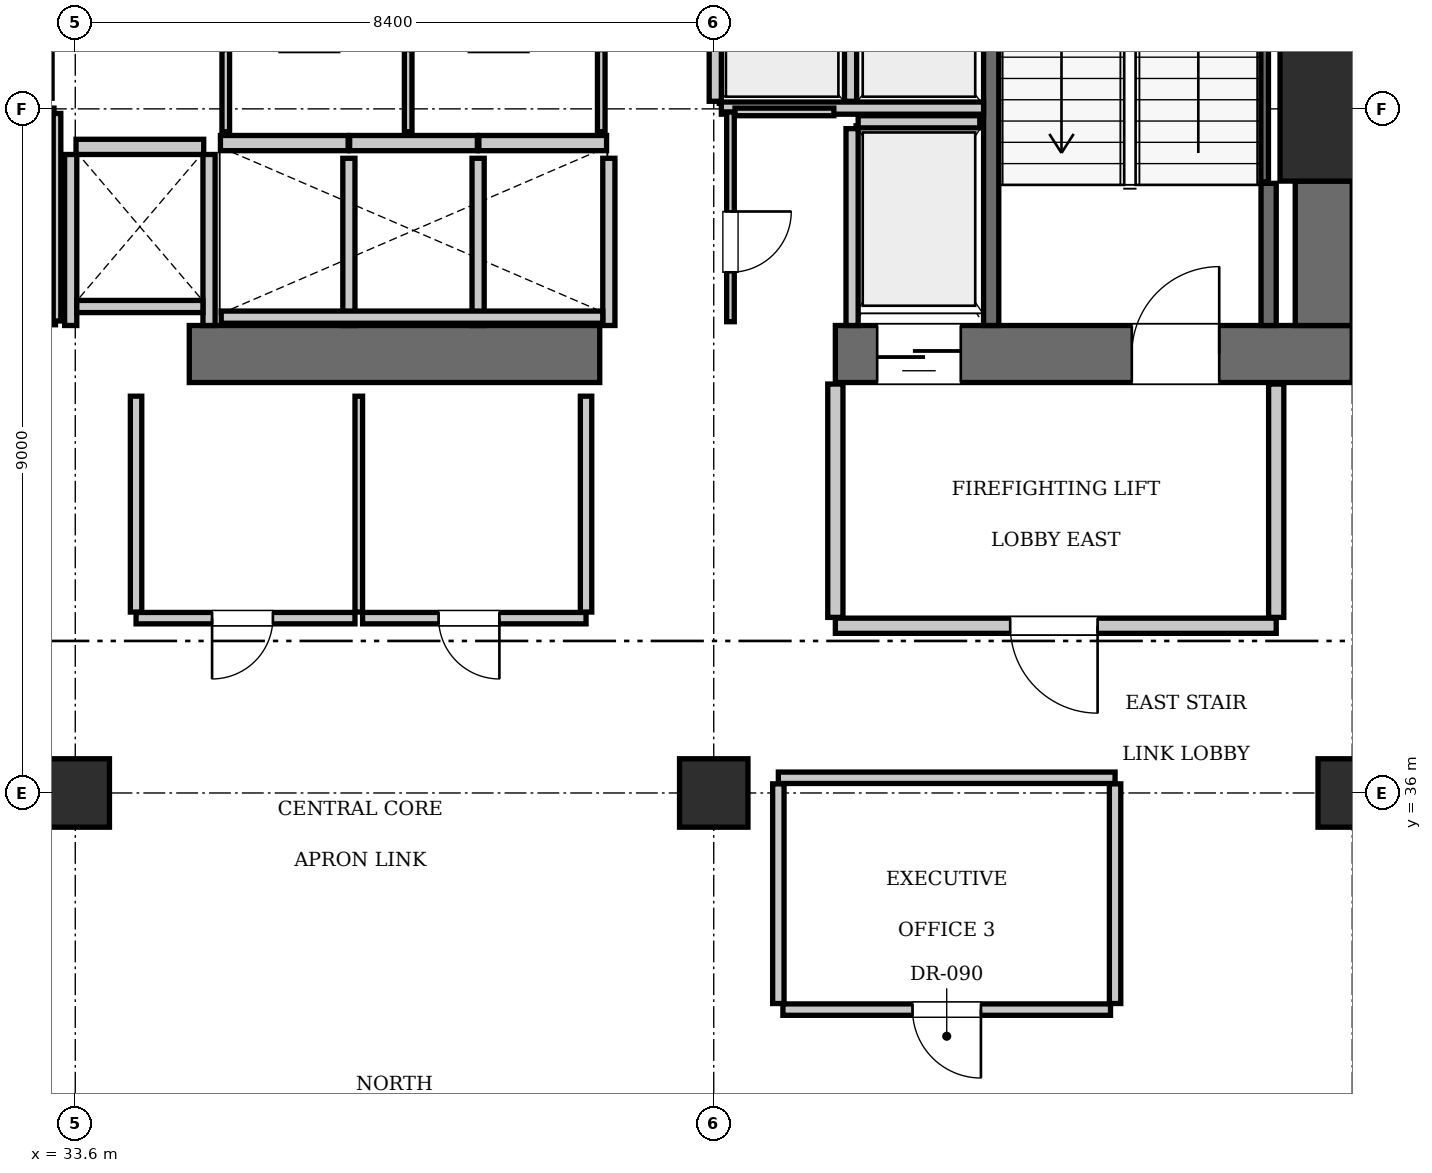
"""IFC4 building model, lengths in metres.
Left out: names, types, materials, properties, quantities, classifications, styles, units other than length and angle.
Written with IfcOpenShell. Run it as: python <this file> out.ifc"""

import sys

from ifc_helpers import new_model, si_unit, direction, frame, frame_2d, origin, origin_2d, place, context, subcontext, project, spatial, rectangle, extrude, element, fill, save


model = new_model("IFC4")
c1 = context("Model", 3, precision=1e-05, world=origin(), true_north=direction((0.0, 1.0)))
c2 = subcontext(c1, "Body", "Model", "MODEL_VIEW")
j1 = project(units=[si_unit("LENGTHUNIT", "METRE"), si_unit("PLANEANGLEUNIT", "RADIAN")], contexts=[c1])
p1 = place(None, origin())
s1 = spatial("IfcSite", under=j1, at=p1, CompositionType="ELEMENT")
p2 = place(p1, origin())
s2 = spatial("IfcBuilding", under=s1, at=p2, CompositionType="ELEMENT")
p3 = place(p2, frame((0.0, 0.0, 204.4)))
s3 = spatial("IfcBuildingStorey", under=s2, at=p3, CompositionType="ELEMENT", Elevation=204.4)
p4 = place(p3, frame((50.4, 45.0, 0.0), z_axis=(0.0, 0.0, 1.0), x_axis=(1.0, 0.0, 0.0)))
e1 = element("IfcColumn", 1, at=p4, inside=s3, PredefinedType="COLUMN", context=c2, shape_type="SweptSolid", body=[
    extrude(rectangle(XDim=1.9, YDim=1.9, at=origin_2d()), origin(), (0.0, 0.0, 1.0), 3.85),
])
p5 = place(p3, frame((35.1, 41.775, 0.0), z_axis=(0.0, 0.0, 1.0), x_axis=(1.0, 0.0, 0.0)))
e2 = element("IfcWall", 2, at=p5, inside=s3, PredefinedType="SHEAR", context=c2, shape_type="SweptSolid", body=[
    extrude(rectangle(XDim=5.4, YDim=0.75, at=frame_2d((2.7, 0.0))), origin(), (0.0, 0.0, 1.0), 3.85),
])
p6 = place(p3, frame((43.6, 41.775, 0.0), z_axis=(0.0, 0.0, 1.0), x_axis=(1.0, 0.0, 0.0)))
e3 = element("IfcWall", 3, at=p6, inside=s3, PredefinedType="SHEAR", context=c2, shape_type="SweptSolid", body=[
    extrude(rectangle(XDim=6.8, YDim=0.75, at=frame_2d((3.4, 0.0))), origin(), (0.0, 0.0, 1.0), 3.85),
])
p7 = place(p6, frame((3.9, 0.0, 0.0)))
e4 = element("IfcOpeningElement", 4, at=p7, cuts=e3, PredefinedType="OPENING", context=c2, shape_type="SweptSolid", body=[
    extrude(rectangle(XDim=1.15, YDim=2.15, at=frame_2d((0.575, 1.075))), frame((0.0, 0.385, 0.0), z_axis=(0.0, -1.0, 0.0), x_axis=(1.0, 0.0, 0.0)), (0.0, 0.0, 1.0), 0.77),
])
p8 = place(p6, frame((0.55, 0.0, 0.0)))
e5 = element("IfcOpeningElement", 5, at=p8, cuts=e3, PredefinedType="OPENING", context=c2, shape_type="SweptSolid", body=[
    extrude(rectangle(XDim=1.1, YDim=2.2, at=frame_2d((0.55, 1.1))), frame((0.0, 0.385, 0.0), z_axis=(0.0, -1.0, 0.0), x_axis=(1.0, 0.0, 0.0)), (0.0, 0.0, 1.0), 0.77),
])
p9 = place(p3, frame((50.025, 42.15, 0.0), z_axis=(0.0, 0.0, 1.0), x_axis=(0.0, 1.0, 0.0)))
e6 = element("IfcWall", 6, at=p9, inside=s3, PredefinedType="SHEAR", context=c2, shape_type="SweptSolid", body=[
    extrude(rectangle(XDim=1.9, YDim=0.75, at=frame_2d((0.95, 0.0))), origin(), (0.0, 0.0, 1.0), 3.85),
])
for number, where, z_axis, x_axis in (
    (7, (33.6, 36.0, 0.0), (0.0, 0.0, 1.0), (1.0, 0.0, 0.0)),
    (8, (42.0, 36.0, 0.0), (0.0, 0.0, 1.0), (1.0, 0.0, 0.0)),
    (9, (50.4, 36.0, 0.0), (0.0, 0.0, 1.0), (1.0, 0.0, 0.0)),
):
    element("IfcColumn", number, at=place(p3, frame(where, z_axis=z_axis, x_axis=x_axis)), inside=s3, PredefinedType="COLUMN", context=c2, shape_type="SweptSolid", body=[
        extrude(rectangle(XDim=0.9, YDim=0.9, at=origin_2d()), origin(), (0.0, 0.0, 1.0), 3.85),
    ])
p10 = place(p3, frame((45.65, 42.15, 0.0), z_axis=(0.0, 0.0, 1.0), x_axis=(0.0, 1.0, 0.0)))
e10 = element("IfcWall", 10, at=p10, inside=s3, PredefinedType="SOLIDWALL", context=c2, shape_type="SweptSolid", body=[
    extrude(rectangle(XDim=9.0, YDim=0.2, at=frame_2d((4.5, 0.0))), origin(), (0.0, 0.0, 1.0), 3.61),
])
p11 = place(p3, frame((49.3, 42.15, 0.0), z_axis=(0.0, 0.0, 1.0), x_axis=(0.0, 1.0, 0.0)))
e11 = element("IfcWall", 11, at=p11, inside=s3, PredefinedType="SOLIDWALL", context=c2, shape_type="SweptSolid", body=[
    extrude(rectangle(XDim=1.87, YDim=0.2, at=frame_2d((0.935, 0.0))), origin(), (0.0, 0.0, 1.0), 3.61),
])
p12 = place(p3, frame((49.248, 44.04, 0.0), z_axis=(0.0, 0.0, 1.0), x_axis=(0.0, 1.0, 0.0)))
e12 = element("IfcWall", 12, at=p12, inside=s3, PredefinedType="SOLIDWALL", context=c2, shape_type="SweptSolid", body=[
    extrude(rectangle(XDim=1.92, YDim=0.1, at=frame_2d((0.96, 0.0))), origin(), (0.0, 0.0, 1.0), 3.61),
])
for number, where, z_axis, x_axis in (
    (13, (35.51, 44.55, 0.0), (0.0, 0.0, 1.0), (1.0, 0.0, 0.0)),
    (14, (37.21, 44.55, 0.0), (0.0, 0.0, 1.0), (1.0, 0.0, 0.0)),
):
    element("IfcWall", number, at=place(p3, frame(where, z_axis=z_axis, x_axis=x_axis)), inside=s3, PredefinedType="SOLIDWALL", context=c2, shape_type="SweptSolid", body=[
        extrude(rectangle(XDim=1.68, YDim=0.2, at=frame_2d((0.84, 0.0))), origin(), (0.0, 0.0, 1.0), 3.61),
    ])
p13 = place(p3, frame((38.91, 44.55, 0.0), z_axis=(0.0, 0.0, 1.0), x_axis=(1.0, 0.0, 0.0)))
e15 = element("IfcWall", 15, at=p13, inside=s3, PredefinedType="SOLIDWALL", context=c2, shape_type="SweptSolid", body=[
    extrude(rectangle(XDim=1.68, YDim=0.2, at=frame_2d((0.84, 0.0))), origin(), (0.0, 0.0, 1.0), 3.61),
])
p14 = place(p3, frame((33.61, 44.5, 0.0), z_axis=(0.0, 0.0, 1.0), x_axis=(1.0, 0.0, 0.0)))
e16 = element("IfcWall", 16, at=p14, inside=s3, PredefinedType="SOLIDWALL", context=c2, shape_type="SweptSolid", body=[
    extrude(rectangle(XDim=1.68, YDim=0.2, at=frame_2d((0.84, 0.0))), origin(), (0.0, 0.0, 1.0), 3.61),
])
p15 = place(p3, frame((43.9, 44.83, 0.0), z_axis=(0.0, 0.0, 1.0), x_axis=(1.0, 0.0, 0.0)))
e17 = element("IfcWall", 17, at=p15, inside=s3, PredefinedType="SOLIDWALL", context=c2, shape_type="SweptSolid", body=[
    extrude(rectangle(XDim=1.6, YDim=0.16, at=frame_2d((0.8, 0.0))), origin(), (0.0, 0.0, 1.0), 3.61),
])
p16 = place(p3, frame((43.82, 42.15, 0.0), z_axis=(0.0, 0.0, 1.0), x_axis=(0.0, 1.0, 0.0)))
e18 = element("IfcWall", 18, at=p16, inside=s3, PredefinedType="SOLIDWALL", context=c2, shape_type="SweptSolid", body=[
    extrude(rectangle(XDim=2.59, YDim=0.16, at=frame_2d((1.295, 0.0))), origin(), (0.0, 0.0, 1.0), 3.61),
])
for number, where, z_axis, x_axis in (
    (19, (42.02, 45.1, 0.0), (0.0, 0.0, 1.0), (0.0, 1.0, 0.0)),
    (20, (43.8, 45.1, 0.0), (0.0, 0.0, 1.0), (0.0, 1.0, 0.0)),
):
    element("IfcWall", number, at=place(p3, frame(where, z_axis=z_axis, x_axis=x_axis)), inside=s3, PredefinedType="SOLIDWALL", context=c2, shape_type="SweptSolid", body=[
        extrude(rectangle(XDim=1.95, YDim=0.16, at=frame_2d((0.975, 0.0))), origin(), (0.0, 0.0, 1.0), 3.61),
    ])
p17 = place(p3, frame((42.1, 45.01, 0.0), z_axis=(0.0, 0.0, 1.0), x_axis=(1.0, 0.0, 0.0)))
e21 = element("IfcWall", 21, at=p17, inside=s3, PredefinedType="SOLIDWALL", context=c2, shape_type="SweptSolid", body=[
    extrude(rectangle(XDim=3.45, YDim=0.16, at=frame_2d((1.725, 0.0))), origin(), (0.0, 0.0, 1.0), 3.61),
])
for number, where, z_axis, x_axis in (
    (22, (37.2, 42.15, 0.0), (0.0, 0.0, 1.0), (0.0, 1.0, 0.0)),
    (23, (38.9, 42.15, 0.0), (0.0, 0.0, 1.0), (0.0, 1.0, 0.0)),
    (24, (40.62, 42.15, 0.0), (0.0, 0.0, 1.0), (0.0, 1.0, 0.0)),
):
    element("IfcWall", number, at=place(p3, frame(where, z_axis=z_axis, x_axis=x_axis)), inside=s3, PredefinedType="SOLIDWALL", context=c2, shape_type="SweptSolid", body=[
        extrude(rectangle(XDim=2.2, YDim=0.16, at=frame_2d((1.1, 0.0))), origin(), (0.0, 0.0, 1.0), 3.61),
    ])
p18 = place(p3, frame((35.52, 42.26, 0.0), z_axis=(0.0, 0.0, 1.0), x_axis=(1.0, 0.0, 0.0)))
e25 = element("IfcWall", 25, at=p18, inside=s3, PredefinedType="SOLIDWALL", context=c2, shape_type="SweptSolid", body=[
    extrude(rectangle(XDim=5.02, YDim=0.16, at=frame_2d((2.51, 0.0))), origin(), (0.0, 0.0, 1.0), 3.61),
])
for number, where, z_axis, x_axis in (
    (26, (33.54, 42.15, 0.0), (0.0, 0.0, 1.0), (0.0, 1.0, 0.0)),
    (27, (35.36, 42.15, 0.0), (0.0, 0.0, 1.0), (0.0, 1.0, 0.0)),
):
    element("IfcWall", number, at=place(p3, frame(where, z_axis=z_axis, x_axis=x_axis)), inside=s3, PredefinedType="SOLIDWALL", context=c2, shape_type="SweptSolid", body=[
        extrude(rectangle(XDim=2.25, YDim=0.16, at=frame_2d((1.125, 0.0))), origin(), (0.0, 0.0, 1.0), 3.61),
    ])
p19 = place(p3, frame((33.62, 42.4, 0.0), z_axis=(0.0, 0.0, 1.0), x_axis=(1.0, 0.0, 0.0)))
e28 = element("IfcWall", 28, at=p19, inside=s3, PredefinedType="SOLIDWALL", context=c2, shape_type="SweptSolid", body=[
    extrude(rectangle(XDim=1.66, YDim=0.16, at=frame_2d((0.83, 0.0))), origin(), (0.0, 0.0, 1.0), 3.61),
])
p20 = place(p3, frame((43.6, 38.2, 0.0), z_axis=(0.0, 0.0, 1.0), x_axis=(1.0, 0.0, 0.0)))
e29 = element("IfcWall", 29, at=p20, inside=s3, PredefinedType="PARTITIONING", context=c2, shape_type="SweptSolid", body=[
    extrude(rectangle(XDim=5.8, YDim=0.2, at=frame_2d((2.9, 0.0))), origin(), (0.0, 0.0, 1.0), 3.61),
])
p21 = place(p20, frame((2.3, 0.0, 0.0)))
e30 = element("IfcOpeningElement", 30, at=p21, cuts=e29, PredefinedType="OPENING", context=c2, shape_type="SweptSolid", body=[
    extrude(rectangle(XDim=1.15, YDim=2.15, at=frame_2d((0.575, 1.075))), frame((0.0, 0.11, 0.0), z_axis=(0.0, -1.0, 0.0), x_axis=(1.0, 0.0, 0.0)), (0.0, 0.0, 1.0), 0.22),
])
for number, where, z_axis, x_axis in (
    (31, (43.6, 38.31, 0.0), (0.0, 0.0, 1.0), (0.0, 1.0, 0.0)),
    (32, (49.4, 38.31, 0.0), (0.0, 0.0, 1.0), (0.0, 1.0, 0.0)),
):
    element("IfcWall", number, at=place(p3, frame(where, z_axis=z_axis, x_axis=x_axis)), inside=s3, PredefinedType="PARTITIONING", context=c2, shape_type="SweptSolid", body=[
        extrude(rectangle(XDim=3.07, YDim=0.2, at=frame_2d((1.535, 0.0))), origin(), (0.0, 0.0, 1.0), 3.61),
    ])
p22 = place(p3, frame((32.02, 42.21, 0.0), z_axis=(0.0, 0.0, 1.0), x_axis=(1.0, 0.0, 0.0)))
e33 = element("IfcWall", 33, at=p22, inside=s3, PredefinedType="PARTITIONING", context=c2, shape_type="SweptSolid", body=[
    extrude(rectangle(XDim=1.32, YDim=0.1, at=frame_2d((0.66, 0.0))), origin(), (0.0, 0.0, 1.0), 3.61),
])
p23 = place(p22, frame((0.24, 0.0, 0.0)))
e34 = element("IfcOpeningElement", 34, at=p23, cuts=e33, PredefinedType="OPENING", context=c2, shape_type="SweptSolid", body=[
    extrude(rectangle(XDim=0.8, YDim=2.05, at=frame_2d((0.4, 1.025))), frame((0.0, 0.06, 0.0), z_axis=(0.0, -1.0, 0.0), x_axis=(1.0, 0.0, 0.0)), (0.0, 0.0, 1.0), 0.12),
])
p24 = place(p3, frame((31.84, 44.96, 0.0), z_axis=(0.0, 0.0, 1.0), x_axis=(1.0, 0.0, 0.0)))
e35 = element("IfcWall", 35, at=p24, inside=s3, PredefinedType="PARTITIONING", context=c2, shape_type="SweptSolid", body=[
    extrude(rectangle(XDim=1.48, YDim=0.1, at=frame_2d((0.74, 0.0))), origin(), (0.0, 0.0, 1.0), 3.61),
])
p25 = place(p3, frame((33.36, 42.21, 0.0), z_axis=(0.0, 0.0, 1.0), x_axis=(0.0, 1.0, 0.0)))
e36 = element("IfcWall", 36, at=p25, inside=s3, PredefinedType="PARTITIONING", context=c2, shape_type="SweptSolid", body=[
    extrude(rectangle(XDim=2.73, YDim=0.1, at=frame_2d((1.365, 0.0))), origin(), (0.0, 0.0, 1.0), 3.61),
])
for number, where, z_axis, x_axis in (
    (37, (35.58, 44.7, 0.0), (0.0, 0.0, 1.0), (0.0, 1.0, 0.0)),
    (38, (37.98, 44.7, 0.0), (0.0, 0.0, 1.0), (0.0, 1.0, 0.0)),
    (39, (40.52, 44.7, 0.0), (0.0, 0.0, 1.0), (0.0, 1.0, 0.0)),
):
    element("IfcWall", number, at=place(p3, frame(where, z_axis=z_axis, x_axis=x_axis)), inside=s3, PredefinedType="PARTITIONING", context=c2, shape_type="SweptSolid", body=[
        extrude(rectangle(XDim=1.08, YDim=0.1, at=frame_2d((0.54, 0.0))), origin(), (0.0, 0.0, 1.0), 3.61),
    ])
p26 = place(p3, frame((42.22, 42.2, 0.0), z_axis=(0.0, 0.0, 1.0), x_axis=(0.0, 1.0, 0.0)))
e40 = element("IfcWall", 40, at=p26, inside=s3, PredefinedType="PARTITIONING", context=c2, shape_type="SweptSolid", body=[
    extrude(rectangle(XDim=2.76, YDim=0.1, at=frame_2d((1.38, 0.0))), origin(), (0.0, 0.0, 1.0), 3.61),
])
p27 = place(p26, frame((0.65, 0.0, 0.0)))
e41 = element("IfcOpeningElement", 41, at=p27, cuts=e40, PredefinedType="OPENING", context=c2, shape_type="SweptSolid", body=[
    extrude(rectangle(XDim=0.8, YDim=2.05, at=frame_2d((0.4, 1.025))), frame((0.0, 0.06, 0.0), z_axis=(0.0, -1.0, 0.0), x_axis=(1.0, 0.0, 0.0)), (0.0, 0.0, 1.0), 0.12),
])
p28 = place(p3, frame((42.28, 44.96, 0.0), z_axis=(0.0, 0.0, 1.0), x_axis=(1.0, 0.0, 0.0)))
e42 = element("IfcWall", 42, at=p28, inside=s3, PredefinedType="PARTITIONING", context=c2, shape_type="SweptSolid", body=[
    extrude(rectangle(XDim=1.3, YDim=0.1, at=frame_2d((0.65, 0.0))), origin(), (0.0, 0.0, 1.0), 3.61),
])
p29 = place(p3, frame((34.4, 38.3, 0.0), z_axis=(0.0, 0.0, 1.0), x_axis=(1.0, 0.0, 0.0)))
e43 = element("IfcWall", 43, at=p29, inside=s3, PredefinedType="PARTITIONING", context=c2, shape_type="SweptSolid", body=[
    extrude(rectangle(XDim=2.88, YDim=0.15, at=frame_2d((1.44, 0.0))), origin(), (0.0, 0.0, 1.0), 3.61),
])
p30 = place(p29, frame((1.0, 0.0, 0.0)))
e44 = element("IfcOpeningElement", 44, at=p30, cuts=e43, PredefinedType="OPENING", context=c2, shape_type="SweptSolid", body=[
    extrude(rectangle(XDim=0.8, YDim=2.05, at=frame_2d((0.4, 1.025))), frame((0.0, 0.085, 0.0), z_axis=(0.0, -1.0, 0.0), x_axis=(1.0, 0.0, 0.0)), (0.0, 0.0, 1.0), 0.17),
])
p31 = place(p3, frame((37.38, 38.3, 0.0), z_axis=(0.0, 0.0, 1.0), x_axis=(1.0, 0.0, 0.0)))
e45 = element("IfcWall", 45, at=p31, inside=s3, PredefinedType="PARTITIONING", context=c2, shape_type="SweptSolid", body=[
    extrude(rectangle(XDim=2.94, YDim=0.15, at=frame_2d((1.47, 0.0))), origin(), (0.0, 0.0, 1.0), 3.61),
])
p32 = place(p31, frame((1.0, 0.0, 0.0)))
e46 = element("IfcOpeningElement", 46, at=p32, cuts=e45, PredefinedType="OPENING", context=c2, shape_type="SweptSolid", body=[
    extrude(rectangle(XDim=0.8, YDim=2.05, at=frame_2d((0.4, 1.025))), frame((0.0, 0.085, 0.0), z_axis=(0.0, -1.0, 0.0), x_axis=(1.0, 0.0, 0.0)), (0.0, 0.0, 1.0), 0.17),
])
p33 = place(p3, frame((34.4, 38.38, 0.0), z_axis=(0.0, 0.0, 1.0), x_axis=(0.0, 1.0, 0.0)))
e47 = element("IfcWall", 47, at=p33, inside=s3, PredefinedType="PARTITIONING", context=c2, shape_type="SweptSolid", body=[
    extrude(rectangle(XDim=2.84, YDim=0.15, at=frame_2d((1.42, 0.0))), origin(), (0.0, 0.0, 1.0), 3.61),
])
p34 = place(p3, frame((37.33, 38.38, 0.0), z_axis=(0.0, 0.0, 1.0), x_axis=(0.0, 1.0, 0.0)))
e48 = element("IfcWall", 48, at=p34, inside=s3, PredefinedType="PARTITIONING", context=c2, shape_type="SweptSolid", body=[
    extrude(rectangle(XDim=2.84, YDim=0.1, at=frame_2d((1.42, 0.0))), origin(), (0.0, 0.0, 1.0), 3.61),
])
p35 = place(p3, frame((40.32, 38.38, 0.0), z_axis=(0.0, 0.0, 1.0), x_axis=(0.0, 1.0, 0.0)))
e49 = element("IfcWall", 49, at=p35, inside=s3, PredefinedType="PARTITIONING", context=c2, shape_type="SweptSolid", body=[
    extrude(rectangle(XDim=2.84, YDim=0.15, at=frame_2d((1.42, 0.0))), origin(), (0.0, 0.0, 1.0), 3.61),
])
p36 = place(p3, frame((42.85, 36.2, 0.0), z_axis=(0.0, 0.0, 1.0), x_axis=(1.0, 0.0, 0.0)))
e50 = element("IfcWall", 50, at=p36, inside=s3, PredefinedType="PARTITIONING", context=c2, shape_type="SweptSolid", body=[
    extrude(rectangle(XDim=4.43, YDim=0.15, at=frame_2d((2.215, 0.0))), origin(), (0.0, 0.0, 1.0), 3.61),
])
for number, where, z_axis, x_axis in (
    (51, (42.85, 33.23, 0.0), (0.0, 0.0, 1.0), (0.0, 1.0, 0.0)),
    (52, (47.28, 33.23, 0.0), (0.0, 0.0, 1.0), (0.0, 1.0, 0.0)),
):
    element("IfcWall", number, at=place(p3, frame(where, z_axis=z_axis, x_axis=x_axis)), inside=s3, PredefinedType="PARTITIONING", context=c2, shape_type="SweptSolid", body=[
        extrude(rectangle(XDim=2.89, YDim=0.15, at=frame_2d((1.445, 0.0))), origin(), (0.0, 0.0, 1.0), 3.61),
    ])
p37 = place(p3, frame((42.91, 33.15, 0.0), z_axis=(0.0, 0.0, 1.0), x_axis=(1.0, 0.0, 0.0)))
e53 = element("IfcWall", 53, at=p37, inside=s3, PredefinedType="PARTITIONING", context=c2, shape_type="SweptSolid", body=[
    extrude(rectangle(XDim=4.31, YDim=0.15, at=frame_2d((2.155, 0.0))), origin(), (0.0, 0.0, 1.0), 3.61),
])
p38 = place(p37, frame((1.705, 0.0, 0.0)))
e54 = element("IfcOpeningElement", 54, at=p38, cuts=e53, PredefinedType="OPENING", context=c2, shape_type="SweptSolid", body=[
    extrude(rectangle(XDim=0.9, YDim=2.1, at=frame_2d((0.45, 1.05))), frame((0.0, 0.085, 0.0), z_axis=(0.0, -1.0, 0.0), x_axis=(1.0, 0.0, 0.0)), (0.0, 0.0, 1.0), 0.17),
])
p39 = place(p7, origin())
e55 = element("IfcDoor", 55, at=p39, inside=s3, OperationType="SINGLE_SWING_RIGHT", PredefinedType="DOOR", context=c2, shape_type="SweptSolid", body=[
    extrude(rectangle(XDim=1.15, YDim=2.15, at=frame_2d((0.575, 1.075))), frame((0.0, 0.025, 0.0), z_axis=(0.0, -1.0, 0.0), x_axis=(1.0, 0.0, 0.0)), (0.0, 0.0, 1.0), 0.05),
])
fill(e4, e55)
p40 = place(p8, frame((1.1, 0.0, 0.0), z_axis=(0.0, 0.0, 1.0), x_axis=(-1.0, 0.0, 0.0)))
e56 = element("IfcDoor", 56, at=p40, inside=s3, OperationType="SLIDING_TO_LEFT", PredefinedType="DOOR", context=c2, shape_type="SweptSolid", body=[
    extrude(rectangle(XDim=1.1, YDim=2.2, at=frame_2d((0.55, 1.1))), frame((0.0, 0.025, 0.0), z_axis=(0.0, -1.0, 0.0), x_axis=(1.0, 0.0, 0.0)), (0.0, 0.0, 1.0), 0.05),
])
fill(e5, e56)
p41 = place(p21, frame((1.15, 0.0, 0.0), z_axis=(0.0, 0.0, 1.0), x_axis=(-1.0, 0.0, 0.0)))
e57 = element("IfcDoor", 57, at=p41, inside=s3, OperationType="SINGLE_SWING_LEFT", PredefinedType="DOOR", context=c2, shape_type="SweptSolid", body=[
    extrude(rectangle(XDim=1.15, YDim=2.15, at=frame_2d((0.575, 1.075))), frame((0.0, 0.025, 0.0), z_axis=(0.0, -1.0, 0.0), x_axis=(1.0, 0.0, 0.0)), (0.0, 0.0, 1.0), 0.05),
])
fill(e30, e57)
p42 = place(p27, frame((0.8, 0.0, 0.0), z_axis=(0.0, 0.0, 1.0), x_axis=(-1.0, 0.0, 0.0)))
e58 = element("IfcDoor", 58, at=p42, inside=s3, OperationType="SINGLE_SWING_LEFT", PredefinedType="DOOR", context=c2, shape_type="SweptSolid", body=[
    extrude(rectangle(XDim=0.8, YDim=2.05, at=frame_2d((0.4, 1.025))), frame((0.0, 0.025, 0.0), z_axis=(0.0, -1.0, 0.0), x_axis=(1.0, 0.0, 0.0)), (0.0, 0.0, 1.0), 0.05),
])
fill(e41, e58)
p43 = place(p30, frame((0.8, 0.0, 0.0), z_axis=(0.0, 0.0, 1.0), x_axis=(-1.0, 0.0, 0.0)))
e59 = element("IfcDoor", 59, at=p43, inside=s3, OperationType="SINGLE_SWING_RIGHT", PredefinedType="DOOR", context=c2, shape_type="SweptSolid", body=[
    extrude(rectangle(XDim=0.8, YDim=2.05, at=frame_2d((0.4, 1.025))), frame((0.0, 0.025, 0.0), z_axis=(0.0, -1.0, 0.0), x_axis=(1.0, 0.0, 0.0)), (0.0, 0.0, 1.0), 0.05),
])
fill(e44, e59)
p44 = place(p32, frame((0.8, 0.0, 0.0), z_axis=(0.0, 0.0, 1.0), x_axis=(-1.0, 0.0, 0.0)))
e60 = element("IfcDoor", 60, at=p44, inside=s3, OperationType="SINGLE_SWING_LEFT", PredefinedType="DOOR", context=c2, shape_type="SweptSolid", body=[
    extrude(rectangle(XDim=0.8, YDim=2.05, at=frame_2d((0.4, 1.025))), frame((0.0, 0.025, 0.0), z_axis=(0.0, -1.0, 0.0), x_axis=(1.0, 0.0, 0.0)), (0.0, 0.0, 1.0), 0.05),
])
fill(e46, e60)
p45 = place(p38, frame((0.9, 0.0, 0.0), z_axis=(0.0, 0.0, 1.0), x_axis=(-1.0, 0.0, 0.0)))
e61 = element("IfcDoor", 61, at=p45, inside=s3, OperationType="SINGLE_SWING_LEFT", PredefinedType="DOOR", context=c2, shape_type="SweptSolid", body=[
    extrude(rectangle(XDim=0.9, YDim=2.1, at=frame_2d((0.45, 1.05))), frame((0.0, 0.025, 0.0), z_axis=(0.0, -1.0, 0.0), x_axis=(1.0, 0.0, 0.0)), (0.0, 0.0, 1.0), 0.05),
])
fill(e54, e61)
save(model, sys.argv[1])
